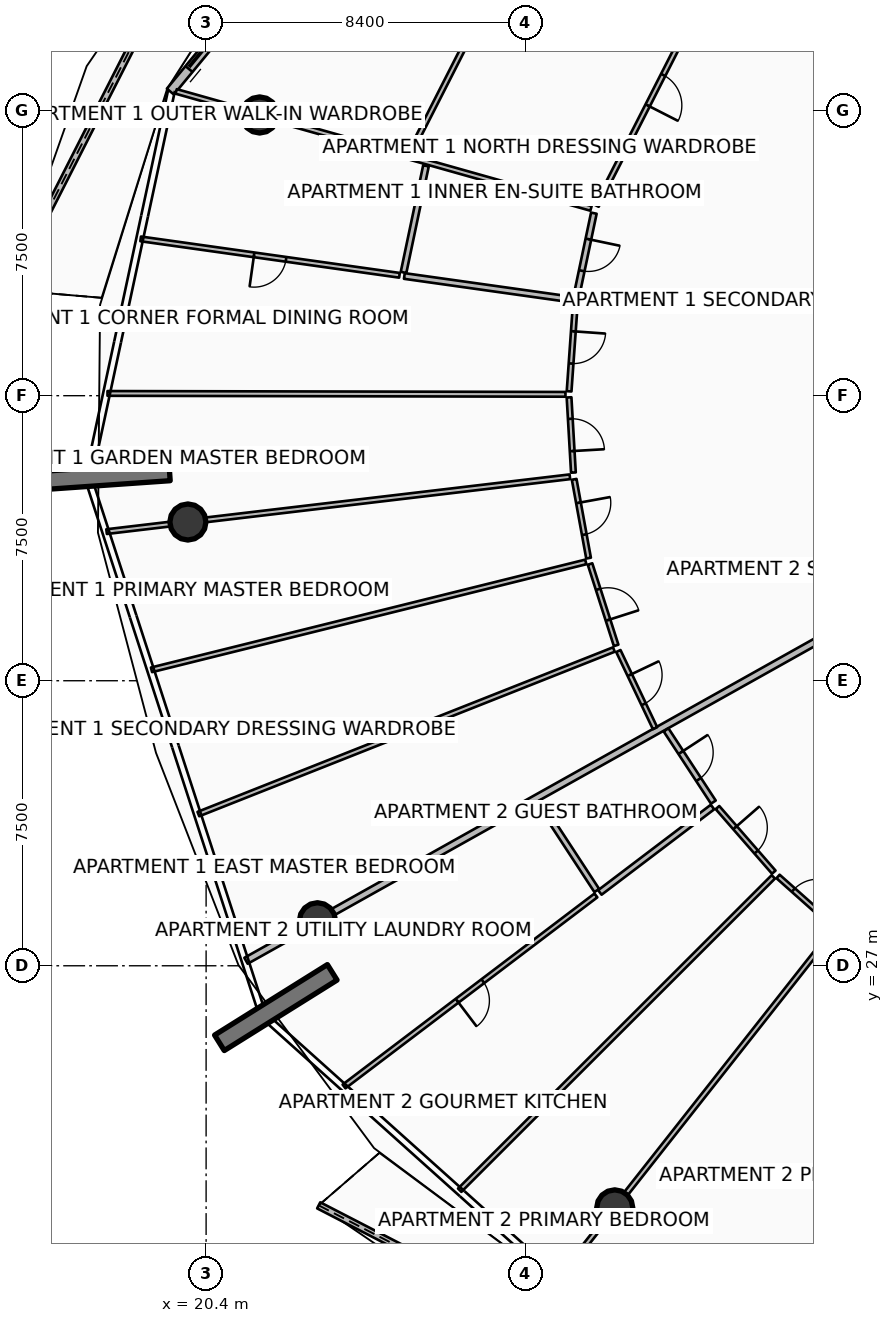
"""IFC4 building model, lengths in metres.
Left out: names, types, materials, properties, quantities, classifications, styles, units other than length and angle.
Written with IfcOpenShell. Run it as: python <this file> out.ifc"""

import sys

from ifc_helpers import new_model, si_unit, direction, frame, frame_2d, origin, origin_2d, place, context, subcontext, project, spatial, polyline, rectangle, circle, outline, extrude, element, fill, save


model = new_model("IFC4")
c1 = context("Model", 3, precision=1e-05, world=origin(), true_north=direction((0.0, 1.0)))
c2 = subcontext(c1, "Body", "Model", "MODEL_VIEW")
j1 = project(units=[si_unit("LENGTHUNIT", "METRE"), si_unit("PLANEANGLEUNIT", "RADIAN")], contexts=[c1])
p1 = place(None, origin())
s1 = spatial("IfcSite", under=j1, at=p1, CompositionType="ELEMENT")
p2 = place(p1, origin())
s2 = spatial("IfcBuilding", under=s1, at=p2, CompositionType="ELEMENT")
p3 = place(p2, frame((0.0, 0.0, 255.95)))
s3 = spatial("IfcBuildingStorey", under=s2, at=p3, CompositionType="ELEMENT", Elevation=255.95)
p4 = place(p3, frame((19.438, 40.003, 0.0), z_axis=(0.0, 0.0, 1.0), x_axis=(-0.997563824095, -0.069759707979, 0.0)))
e1 = element("IfcWall", 1, at=p4, inside=s3, PredefinedType="SOLIDWALL", context=c2, shape_type="SweptSolid", body=[
    extrude(rectangle(XDim=3.5, YDim=0.48, at=frame_2d((1.75, 0.0))), origin(), (0.0, 0.0, 1.0), 3.85),
])
p5 = place(p3, frame((23.719, 26.827, 0.0), z_axis=(0.0, 0.0, 1.0), x_axis=(-0.848033572426, -0.529942506352, 0.0)))
e2 = element("IfcWall", 2, at=p5, inside=s3, PredefinedType="SOLIDWALL", context=c2, shape_type="SweptSolid", body=[
    extrude(rectangle(XDim=3.5, YDim=0.48, at=frame_2d((1.75, 0.0))), origin(), (0.0, 0.0, 1.0), 3.85),
])
for number, where, z_axis, x_axis in (
    (3, (21.809, 49.387, 0.0), (0.0, 0.0, 1.0), (1.0, 0.0, 0.0)),
    (4, (19.92, 38.677, 0.0), (0.0, 0.0, 1.0), (1.0, 0.0, 0.0)),
    (5, (23.33, 28.184, 0.0), (0.0, 0.0, 1.0), (1.0, 0.0, 0.0)),
    (6, (31.153, 20.629, 0.0), (0.0, 0.0, 1.0), (1.0, 0.0, 0.0)),
):
    element("IfcColumn", number, at=place(p3, frame(where, z_axis=z_axis, x_axis=x_axis)), inside=s3, PredefinedType="COLUMN", context=c2, shape_type="SweptSolid", body=[
        extrude(circle(Radius=0.475, at=origin_2d()), origin(), (0.0, 0.0, 1.0), 3.59),
    ])
p6 = place(p3, frame((20.758, 55.746, 0.0), z_axis=(0.0, 0.0, 1.0), x_axis=(-0.45375182612, -0.891128094211, 0.0)))
e7 = element("IfcWall", 7, at=p6, inside=s3, PredefinedType="PARAPET", context=c2, shape_type="SweptSolid", body=[
    extrude(outline(polyline([(0.0, 0.0), (12.3, 0.0), (12.3, 1.747), (6.15, 1.562), (0.0, 1.348), (0.0, 0.0)])), frame((0.0, 0.09, 0.0), z_axis=(0.0, -1.0, 0.0), x_axis=(1.0, 0.0, 0.0)), (0.0, 0.0, 1.0), 0.18),
])
p7 = place(p3, frame((23.363, 20.696, 0.0), z_axis=(0.0, 0.0, 1.0), x_axis=(0.888586869338, -0.458708377556, 0.0)))
e8 = element("IfcWall", 8, at=p7, inside=s3, PredefinedType="PARAPET", context=c2, shape_type="SweptSolid", body=[
    extrude(outline(polyline([(0.0, 0.0), (12.16, 0.0), (12.16, 1.148), (6.08, 1.284), (0.0, 1.483), (0.0, 0.0)])), frame((0.0, 0.09, 0.0), z_axis=(0.0, -1.0, 0.0), x_axis=(1.0, 0.0, 0.0)), (0.0, 0.0, 1.0), 0.18),
])
p8 = place(p3, frame((26.742, 58.822, 0.0), z_axis=(0.0, 0.0, 1.0), x_axis=(-0.636680093065, -0.771128043255, 0.0)))
e9 = element("IfcWall", 9, at=p8, inside=s3, PredefinedType="SOLIDWALL", context=c2, shape_type="SweptSolid", body=[
    extrude(rectangle(XDim=11.438, YDim=0.24, at=frame_2d((5.719, 0.0))), origin(), (0.0, 0.0, 1.0), 2.54),
])
p9 = place(p8, frame((9.218, 0.0, 0.0)))
e10 = element("IfcOpeningElement", 10, at=p9, cuts=e9, PredefinedType="OPENING", context=c2, shape_type="SweptSolid", body=[
    extrude(rectangle(XDim=1.45, YDim=2.15, at=frame_2d((0.725, 1.075))), frame((0.0, 0.13, 0.0), z_axis=(0.0, -1.0, 0.0), x_axis=(1.0, 0.0, 0.0)), (0.0, 0.0, 1.0), 0.26),
])
p10 = place(p8, frame((0.28, 0.0, 0.65)))
e11 = element("IfcOpeningElement", 11, at=p10, cuts=e9, PredefinedType="OPENING", context=c2, shape_type="SweptSolid", body=[
    extrude(rectangle(XDim=1.6, YDim=1.5, at=frame_2d((0.8, 0.75))), frame((0.0, 0.13, 0.0), z_axis=(0.0, -1.0, 0.0), x_axis=(1.0, 0.0, 0.0)), (0.0, 0.0, 1.0), 0.26),
])
p11 = place(p3, frame((37.054, 35.87, 0.0), z_axis=(0.0, 0.0, 1.0), x_axis=(-0.872490186067, -0.488631635506, 0.0)))
e12 = element("IfcWall", 12, at=p11, inside=s3, PredefinedType="PARTITIONING", context=c2, shape_type="SweptSolid", body=[
    extrude(rectangle(XDim=17.884, YDim=0.18, at=frame_2d((8.942, 0.0))), origin(), (0.0, 0.0, 1.0), 2.957),
])
p12 = place(p3, frame((33.772, 53.079, 0.0), z_axis=(0.0, 0.0, 1.0), x_axis=(-0.454012060349, -0.890995538181, 0.0)))
e13 = element("IfcWall", 13, at=p12, inside=s3, PredefinedType="PARTITIONING", context=c2, shape_type="SweptSolid", body=[
    extrude(rectangle(XDim=6.824, YDim=0.125, at=frame_2d((3.412, 0.0))), origin(), (0.0, 0.0, 1.0), 2.957),
])
p13 = place(p12, frame((2.962, 0.0, 0.0)))
e14 = element("IfcOpeningElement", 14, at=p13, cuts=e13, PredefinedType="OPENING", context=c2, shape_type="SweptSolid", body=[
    extrude(rectangle(XDim=0.9, YDim=2.08, at=frame_2d((0.45, 1.04))), frame((0.0, 0.073, 0.0), z_axis=(0.0, -1.0, 0.0), x_axis=(1.0, 0.0, 0.0)), (0.0, 0.0, 1.0), 0.145),
])
p14 = place(p3, frame((29.764, 56.239, 0.0), z_axis=(0.0, 0.0, 1.0), x_axis=(-0.453980126594, -0.891011809494, 0.0)))
e15 = element("IfcWall", 15, at=p14, inside=s3, PredefinedType="PARTITIONING", context=c2, shape_type="SweptSolid", body=[
    extrude(rectangle(XDim=8.816, YDim=0.125, at=frame_2d((4.408, 0.0))), origin(), (0.0, 0.0, 1.0), 2.957),
])
p15 = place(p14, frame((3.958, 0.0, 0.0)))
e16 = element("IfcOpeningElement", 16, at=p15, cuts=e15, PredefinedType="OPENING", context=c2, shape_type="SweptSolid", body=[
    extrude(rectangle(XDim=0.9, YDim=2.08, at=frame_2d((0.45, 1.04))), frame((0.0, 0.073, 0.0), z_axis=(0.0, -1.0, 0.0), x_axis=(1.0, 0.0, 0.0)), (0.0, 0.0, 1.0), 0.145),
])
p16 = place(p3, frame((30.528, 46.928, 0.0), z_axis=(0.0, 0.0, 1.0), x_axis=(-0.962454146261, 0.271444315367, 0.0)))
e17 = element("IfcWall", 17, at=p16, inside=s3, PredefinedType="PARTITIONING", context=c2, shape_type="SweptSolid", body=[
    extrude(rectangle(XDim=11.342, YDim=0.125, at=frame_2d((5.671, 0.0))), origin(), (0.0, 0.0, 1.0), 2.957),
])
p17 = place(p3, frame((30.603, 46.803, 0.0), z_axis=(0.0, 0.0, 1.0), x_axis=(-0.205906433606, -0.978571683935, 0.0)))
e18 = element("IfcWall", 18, at=p17, inside=s3, PredefinedType="PARTITIONING", context=c2, shape_type="SweptSolid", body=[
    extrude(rectangle(XDim=2.247, YDim=0.15, at=frame_2d((1.124, 0.0))), origin(), (0.0, 0.0, 1.0), 2.957),
])
p18 = place(p17, frame((0.698, 0.0, 0.0)))
e19 = element("IfcOpeningElement", 19, at=p18, cuts=e18, PredefinedType="OPENING", context=c2, shape_type="SweptSolid", body=[
    extrude(rectangle(XDim=0.85, YDim=2.06, at=frame_2d((0.425, 1.03))), frame((0.0, 0.085, 0.0), z_axis=(0.0, -1.0, 0.0), x_axis=(1.0, 0.0, 0.0)), (0.0, 0.0, 1.0), 0.17),
])
p19 = place(p3, frame((26.186, 48.049, 0.0), z_axis=(0.0, 0.0, 1.0), x_axis=(-0.205851663269, -0.97858320685, 0.0)))
e20 = element("IfcWall", 20, at=p19, inside=s3, PredefinedType="PARTITIONING", context=c2, shape_type="SweptSolid", body=[
    extrude(rectangle(XDim=2.866, YDim=0.15, at=frame_2d((1.433, 0.0))), origin(), (0.0, 0.0, 1.0), 2.957),
])
p20 = place(p3, frame((30.033, 44.528, 0.0), z_axis=(0.0, 0.0, 1.0), x_axis=(-0.990248320871, 0.139313542101, 0.0)))
e21 = element("IfcWall", 21, at=p20, inside=s3, PredefinedType="PARTITIONING", context=c2, shape_type="SweptSolid", body=[
    extrude(rectangle(XDim=4.46, YDim=0.15, at=frame_2d((2.23, 0.0))), origin(), (0.0, 0.0, 1.0), 3.03),
])
p21 = place(p3, frame((25.488, 45.168, 0.0), z_axis=(0.0, 0.0, 1.0), x_axis=(-0.990239896804, 0.139373407717, 0.0)))
e22 = element("IfcWall", 22, at=p21, inside=s3, PredefinedType="PARTITIONING", context=c2, shape_type="SweptSolid", body=[
    extrude(rectangle(XDim=6.877, YDim=0.125, at=frame_2d((3.438, 0.0))), origin(), (0.0, 0.0, 1.0), 3.03),
])
p22 = place(p21, frame((3.014, 0.0, 0.0)))
e23 = element("IfcOpeningElement", 23, at=p22, cuts=e22, PredefinedType="OPENING", context=c2, shape_type="SweptSolid", body=[
    extrude(rectangle(XDim=0.85, YDim=2.06, at=frame_2d((0.425, 1.03))), frame((0.0, 0.073, 0.0), z_axis=(0.0, -1.0, 0.0), x_axis=(1.0, 0.0, 0.0)), (0.0, 0.0, 1.0), 0.145),
])
p23 = place(p3, frame((29.856, 42.036, 0.0), z_axis=(0.0, 0.0, 1.0), x_axis=(-0.999998028993, 0.001985449601, 0.0)))
e24 = element("IfcWall", 24, at=p23, inside=s3, PredefinedType="PARTITIONING", context=c2, shape_type="SweptSolid", body=[
    extrude(rectangle(XDim=12.051, YDim=0.125, at=frame_2d((6.025, 0.0))), origin(), (0.0, 0.0, 1.0), 3.03),
])
p24 = place(p3, frame((30.116, 44.426, 0.0), z_axis=(0.0, 0.0, 1.0), x_axis=(-0.07082759095, -0.997488572546, 0.0)))
e25 = element("IfcWall", 25, at=p24, inside=s3, PredefinedType="PARTITIONING", context=c2, shape_type="SweptSolid", body=[
    extrude(rectangle(XDim=2.316, YDim=0.125, at=frame_2d((1.158, 0.0))), origin(), (0.0, 0.0, 1.0), 3.03),
])
p25 = place(p24, frame((0.733, 0.0, 0.0)))
e26 = element("IfcOpeningElement", 26, at=p25, cuts=e25, PredefinedType="OPENING", context=c2, shape_type="SweptSolid", body=[
    extrude(rectangle(XDim=0.85, YDim=2.06, at=frame_2d((0.425, 1.03))), frame((0.0, 0.073, 0.0), z_axis=(0.0, -1.0, 0.0), x_axis=(1.0, 0.0, 0.0)), (0.0, 0.0, 1.0), 0.145),
])
p26 = place(p3, frame((29.951, 41.956, 0.0), z_axis=(0.0, 0.0, 1.0), x_axis=(0.057790197943, -0.998328749973, 0.0)))
e27 = element("IfcWall", 27, at=p26, inside=s3, PredefinedType="PARTITIONING", context=c2, shape_type="SweptSolid", body=[
    extrude(rectangle(XDim=1.981, YDim=0.125, at=frame_2d((0.991, 0.0))), origin(), (0.0, 0.0, 1.0), 2.957),
])
p27 = place(p26, frame((0.566, 0.0, 0.0)))
e28 = element("IfcOpeningElement", 28, at=p27, cuts=e27, PredefinedType="OPENING", context=c2, shape_type="SweptSolid", body=[
    extrude(rectangle(XDim=0.85, YDim=2.06, at=frame_2d((0.425, 1.03))), frame((0.0, 0.073, 0.0), z_axis=(0.0, -1.0, 0.0), x_axis=(1.0, 0.0, 0.0)), (0.0, 0.0, 1.0), 0.145),
])
p28 = place(p3, frame((29.972, 39.866, 0.0), z_axis=(0.0, 0.0, 1.0), x_axis=(-0.993068089356, -0.117540503246, 0.0)))
e29 = element("IfcWall", 29, at=p28, inside=s3, PredefinedType="PARTITIONING", context=c2, shape_type="SweptSolid", body=[
    extrude(rectangle(XDim=12.276, YDim=0.125, at=frame_2d((6.138, 0.0))), origin(), (0.0, 0.0, 1.0), 2.957),
])
p29 = place(p3, frame((30.391, 37.626, 0.0), z_axis=(0.0, 0.0, 1.0), x_axis=(-0.970503640625, -0.24108646485, 0.0)))
e30 = element("IfcWall", 30, at=p29, inside=s3, PredefinedType="PARTITIONING", context=c2, shape_type="SweptSolid", body=[
    extrude(rectangle(XDim=11.775, YDim=0.125, at=frame_2d((5.888, 0.0))), origin(), (0.0, 0.0, 1.0), 3.03),
])
p30 = place(p3, frame((31.13, 35.321, 0.0), z_axis=(0.0, 0.0, 1.0), x_axis=(-0.929773898428, -0.368131087796, 0.0)))
e31 = element("IfcWall", 31, at=p30, inside=s3, PredefinedType="PARTITIONING", context=c2, shape_type="SweptSolid", body=[
    extrude(rectangle(XDim=11.76, YDim=0.125, at=frame_2d((5.88, 0.0))), origin(), (0.0, 0.0, 1.0), 3.03),
])
p31 = place(p3, frame((30.085, 39.799, 0.0), z_axis=(0.0, 0.0, 1.0), x_axis=(0.179690800857, -0.983723139957, 0.0)))
e32 = element("IfcWall", 32, at=p31, inside=s3, PredefinedType="PARTITIONING", context=c2, shape_type="SweptSolid", body=[
    extrude(rectangle(XDim=2.107, YDim=0.125, at=frame_2d((1.054, 0.0))), origin(), (0.0, 0.0, 1.0), 2.957),
])
p32 = place(p31, frame((0.629, 0.0, 0.0)))
e33 = element("IfcOpeningElement", 33, at=p32, cuts=e32, PredefinedType="OPENING", context=c2, shape_type="SweptSolid", body=[
    extrude(rectangle(XDim=0.85, YDim=2.06, at=frame_2d((0.425, 1.03))), frame((0.0, 0.073, 0.0), z_axis=(0.0, -1.0, 0.0), x_axis=(1.0, 0.0, 0.0)), (0.0, 0.0, 1.0), 0.145),
])
p33 = place(p3, frame((30.503, 37.571, 0.0), z_axis=(0.0, 0.0, 1.0), x_axis=(0.305327243998, -0.952247485727, 0.0)))
e34 = element("IfcWall", 34, at=p33, inside=s3, PredefinedType="PARTITIONING", context=c2, shape_type="SweptSolid", body=[
    extrude(rectangle(XDim=2.249, YDim=0.125, at=frame_2d((1.124, 0.0))), origin(), (0.0, 0.0, 1.0), 3.03),
])
p34 = place(p33, frame((0.699, 0.0, 0.0)))
e35 = element("IfcOpeningElement", 35, at=p34, cuts=e34, PredefinedType="OPENING", context=c2, shape_type="SweptSolid", body=[
    extrude(rectangle(XDim=0.85, YDim=2.06, at=frame_2d((0.425, 1.03))), frame((0.0, 0.073, 0.0), z_axis=(0.0, -1.0, 0.0), x_axis=(1.0, 0.0, 0.0)), (0.0, 0.0, 1.0), 0.145),
])
p35 = place(p3, frame((31.248, 35.281, 0.0), z_axis=(0.0, 0.0, 1.0), x_axis=(0.429406696771, -0.903111227241, 0.0)))
e36 = element("IfcWall", 36, at=p35, inside=s3, PredefinedType="PARTITIONING", context=c2, shape_type="SweptSolid", body=[
    extrude(rectangle(XDim=2.249, YDim=0.125, at=frame_2d((1.124, 0.0))), origin(), (0.0, 0.0, 1.0), 2.957),
])
p36 = place(p35, frame((0.699, 0.0, 0.0)))
e37 = element("IfcOpeningElement", 37, at=p36, cuts=e36, PredefinedType="OPENING", context=c2, shape_type="SweptSolid", body=[
    extrude(rectangle(XDim=0.85, YDim=2.06, at=frame_2d((0.425, 1.03))), frame((0.0, 0.073, 0.0), z_axis=(0.0, -1.0, 0.0), x_axis=(1.0, 0.0, 0.0)), (0.0, 0.0, 1.0), 0.145),
])
p37 = place(p3, frame((36.903, 27.924, 0.0), z_axis=(0.0, 0.0, 1.0), x_axis=(-0.619090039254, -0.785320013304, 0.0)))
e38 = element("IfcWall", 38, at=p37, inside=s3, PredefinedType="PARTITIONING", context=c2, shape_type="SweptSolid", body=[
    extrude(rectangle(XDim=11.672, YDim=0.125, at=frame_2d((5.836, 0.0))), origin(), (0.0, 0.0, 1.0), 2.957),
])
p38 = place(p3, frame((32.503, 33.207, 0.0), z_axis=(0.0, 0.0, 1.0), x_axis=(0.54776176335, -0.836634358972, 0.0)))
e39 = element("IfcWall", 39, at=p38, inside=s3, PredefinedType="PARTITIONING", context=c2, shape_type="SweptSolid", body=[
    extrude(rectangle(XDim=2.272, YDim=0.15, at=frame_2d((1.136, 0.0))), origin(), (0.0, 0.0, 1.0), 2.957),
])
p39 = place(p38, frame((0.711, 0.0, 0.0)))
e40 = element("IfcOpeningElement", 40, at=p39, cuts=e39, PredefinedType="OPENING", context=c2, shape_type="SweptSolid", body=[
    extrude(rectangle(XDim=0.85, YDim=2.06, at=frame_2d((0.425, 1.03))), frame((0.0, 0.085, 0.0), z_axis=(0.0, -1.0, 0.0), x_axis=(1.0, 0.0, 0.0)), (0.0, 0.0, 1.0), 0.17),
])
p40 = place(p3, frame((29.144, 31.326, 0.0), z_axis=(0.0, 0.0, 1.0), x_axis=(0.547727893033, -0.836656533587, 0.0)))
e41 = element("IfcWall", 41, at=p40, inside=s3, PredefinedType="PARTITIONING", context=c2, shape_type="SweptSolid", body=[
    extrude(rectangle(XDim=2.804, YDim=0.15, at=frame_2d((1.402, 0.0))), origin(), (0.0, 0.0, 1.0), 2.957),
])
p41 = place(p3, frame((33.725, 31.177, 0.0), z_axis=(0.0, 0.0, 1.0), x_axis=(-0.796854692537, -0.604171001441, 0.0)))
e42 = element("IfcWall", 42, at=p41, inside=s3, PredefinedType="PARTITIONING", context=c2, shape_type="SweptSolid", body=[
    extrude(rectangle(XDim=3.72, YDim=0.15, at=frame_2d((1.86, 0.0))), origin(), (0.0, 0.0, 1.0), 3.03),
])
p42 = place(p3, frame((30.657, 28.851, 0.0), z_axis=(0.0, 0.0, 1.0), x_axis=(-0.796843780875, -0.604185392807, 0.0)))
e43 = element("IfcWall", 43, at=p42, inside=s3, PredefinedType="PARTITIONING", context=c2, shape_type="SweptSolid", body=[
    extrude(rectangle(XDim=8.318, YDim=0.125, at=frame_2d((4.159, 0.0))), origin(), (0.0, 0.0, 1.0), 3.03),
])
p43 = place(p42, frame((3.734, 0.0, 0.0)))
e44 = element("IfcOpeningElement", 44, at=p43, cuts=e43, PredefinedType="OPENING", context=c2, shape_type="SweptSolid", body=[
    extrude(rectangle(XDim=0.85, YDim=2.06, at=frame_2d((0.425, 1.03))), frame((0.0, 0.073, 0.0), z_axis=(0.0, -1.0, 0.0), x_axis=(1.0, 0.0, 0.0)), (0.0, 0.0, 1.0), 0.145),
])
p44 = place(p3, frame((35.326, 29.34, 0.0), z_axis=(0.0, 0.0, 1.0), x_axis=(-0.707472916484, -0.706740456208, 0.0)))
e45 = element("IfcWall", 45, at=p44, inside=s3, PredefinedType="PARTITIONING", context=c2, shape_type="SweptSolid", body=[
    extrude(rectangle(XDim=11.666, YDim=0.125, at=frame_2d((5.833, 0.0))), origin(), (0.0, 0.0, 1.0), 3.03),
])
p45 = place(p3, frame((33.856, 31.163, 0.0), z_axis=(0.0, 0.0, 1.0), x_axis=(0.656985315096, -0.753903372952, 0.0)))
e46 = element("IfcWall", 46, at=p45, inside=s3, PredefinedType="PARTITIONING", context=c2, shape_type="SweptSolid", body=[
    extrude(rectangle(XDim=2.255, YDim=0.125, at=frame_2d((1.127, 0.0))), origin(), (0.0, 0.0, 1.0), 3.03),
])
p46 = place(p45, frame((0.702, 0.0, 0.0)))
e47 = element("IfcOpeningElement", 47, at=p46, cuts=e46, PredefinedType="OPENING", context=c2, shape_type="SweptSolid", body=[
    extrude(rectangle(XDim=0.85, YDim=2.06, at=frame_2d((0.425, 1.03))), frame((0.0, 0.073, 0.0), z_axis=(0.0, -1.0, 0.0), x_axis=(1.0, 0.0, 0.0)), (0.0, 0.0, 1.0), 0.145),
])
p47 = place(p3, frame((35.45, 29.35, 0.0), z_axis=(0.0, 0.0, 1.0), x_axis=(0.747360411924, -0.664418854857, 0.0)))
e48 = element("IfcWall", 48, at=p47, inside=s3, PredefinedType="PARTITIONING", context=c2, shape_type="SweptSolid", body=[
    extrude(rectangle(XDim=1.928, YDim=0.125, at=frame_2d((0.964, 0.0))), origin(), (0.0, 0.0, 1.0), 2.957),
])
p48 = place(p47, frame((0.539, 0.0, 0.0)))
e49 = element("IfcOpeningElement", 49, at=p48, cuts=e48, PredefinedType="OPENING", context=c2, shape_type="SweptSolid", body=[
    extrude(rectangle(XDim=0.85, YDim=2.06, at=frame_2d((0.425, 1.03))), frame((0.0, 0.073, 0.0), z_axis=(0.0, -1.0, 0.0), x_axis=(1.0, 0.0, 0.0)), (0.0, 0.0, 1.0), 0.145),
])
p49 = place(p9, origin())
e50 = element("IfcDoor", 50, at=p49, inside=s3, OperationType="DOUBLE_DOOR_SLIDING", PredefinedType="DOOR", context=c2, shape_type="SweptSolid", body=[
    extrude(rectangle(XDim=1.45, YDim=2.15, at=frame_2d((0.725, 1.075))), frame((0.0, 0.025, 0.0), z_axis=(0.0, -1.0, 0.0), x_axis=(1.0, 0.0, 0.0)), (0.0, 0.0, 1.0), 0.05),
])
fill(e10, e50)
p50 = place(p13, origin())
e51 = element("IfcDoor", 51, at=p50, inside=s3, OperationType="SINGLE_SWING_RIGHT", PredefinedType="DOOR", context=c2, shape_type="SweptSolid", body=[
    extrude(rectangle(XDim=0.9, YDim=2.08, at=frame_2d((0.45, 1.04))), frame((0.0, 0.025, 0.0), z_axis=(0.0, -1.0, 0.0), x_axis=(1.0, 0.0, 0.0)), (0.0, 0.0, 1.0), 0.05),
])
fill(e14, e51)
p51 = place(p18, origin())
e52 = element("IfcDoor", 52, at=p51, inside=s3, OperationType="SINGLE_SWING_LEFT", PredefinedType="DOOR", context=c2, shape_type="SweptSolid", body=[
    extrude(rectangle(XDim=0.85, YDim=2.06, at=frame_2d((0.425, 1.03))), frame((0.0, 0.025, 0.0), z_axis=(0.0, -1.0, 0.0), x_axis=(1.0, 0.0, 0.0)), (0.0, 0.0, 1.0), 0.05),
])
fill(e19, e52)
p52 = place(p22, origin())
e53 = element("IfcDoor", 53, at=p52, inside=s3, OperationType="SINGLE_SWING_RIGHT", PredefinedType="DOOR", context=c2, shape_type="SweptSolid", body=[
    extrude(rectangle(XDim=0.85, YDim=2.06, at=frame_2d((0.425, 1.03))), frame((0.0, 0.025, 0.0), z_axis=(0.0, -1.0, 0.0), x_axis=(1.0, 0.0, 0.0)), (0.0, 0.0, 1.0), 0.05),
])
fill(e23, e53)
p53 = place(p25, origin())
e54 = element("IfcDoor", 54, at=p53, inside=s3, OperationType="SINGLE_SWING_LEFT", PredefinedType="DOOR", context=c2, shape_type="SweptSolid", body=[
    extrude(rectangle(XDim=0.85, YDim=2.06, at=frame_2d((0.425, 1.03))), frame((0.0, 0.025, 0.0), z_axis=(0.0, -1.0, 0.0), x_axis=(1.0, 0.0, 0.0)), (0.0, 0.0, 1.0), 0.05),
])
fill(e26, e54)
p54 = place(p27, origin())
e55 = element("IfcDoor", 55, at=p54, inside=s3, OperationType="SINGLE_SWING_RIGHT", PredefinedType="DOOR", context=c2, shape_type="SweptSolid", body=[
    extrude(rectangle(XDim=0.85, YDim=2.06, at=frame_2d((0.425, 1.03))), frame((0.0, 0.025, 0.0), z_axis=(0.0, -1.0, 0.0), x_axis=(1.0, 0.0, 0.0)), (0.0, 0.0, 1.0), 0.05),
])
fill(e28, e55)
p55 = place(p32, origin())
e56 = element("IfcDoor", 56, at=p55, inside=s3, OperationType="SINGLE_SWING_LEFT", PredefinedType="DOOR", context=c2, shape_type="SweptSolid", body=[
    extrude(rectangle(XDim=0.85, YDim=2.06, at=frame_2d((0.425, 1.03))), frame((0.0, 0.025, 0.0), z_axis=(0.0, -1.0, 0.0), x_axis=(1.0, 0.0, 0.0)), (0.0, 0.0, 1.0), 0.05),
])
fill(e33, e56)
p56 = place(p34, origin())
e57 = element("IfcDoor", 57, at=p56, inside=s3, OperationType="SINGLE_SWING_RIGHT", PredefinedType="DOOR", context=c2, shape_type="SweptSolid", body=[
    extrude(rectangle(XDim=0.85, YDim=2.06, at=frame_2d((0.425, 1.03))), frame((0.0, 0.025, 0.0), z_axis=(0.0, -1.0, 0.0), x_axis=(1.0, 0.0, 0.0)), (0.0, 0.0, 1.0), 0.05),
])
fill(e35, e57)
p57 = place(p36, origin())
e58 = element("IfcDoor", 58, at=p57, inside=s3, OperationType="SINGLE_SWING_LEFT", PredefinedType="DOOR", context=c2, shape_type="SweptSolid", body=[
    extrude(rectangle(XDim=0.85, YDim=2.06, at=frame_2d((0.425, 1.03))), frame((0.0, 0.025, 0.0), z_axis=(0.0, -1.0, 0.0), x_axis=(1.0, 0.0, 0.0)), (0.0, 0.0, 1.0), 0.05),
])
fill(e37, e58)
p58 = place(p39, origin())
e59 = element("IfcDoor", 59, at=p58, inside=s3, OperationType="SINGLE_SWING_LEFT", PredefinedType="DOOR", context=c2, shape_type="SweptSolid", body=[
    extrude(rectangle(XDim=0.85, YDim=2.06, at=frame_2d((0.425, 1.03))), frame((0.0, 0.025, 0.0), z_axis=(0.0, -1.0, 0.0), x_axis=(1.0, 0.0, 0.0)), (0.0, 0.0, 1.0), 0.05),
])
fill(e40, e59)
p59 = place(p43, origin())
e60 = element("IfcDoor", 60, at=p59, inside=s3, OperationType="SINGLE_SWING_RIGHT", PredefinedType="DOOR", context=c2, shape_type="SweptSolid", body=[
    extrude(rectangle(XDim=0.85, YDim=2.06, at=frame_2d((0.425, 1.03))), frame((0.0, 0.025, 0.0), z_axis=(0.0, -1.0, 0.0), x_axis=(1.0, 0.0, 0.0)), (0.0, 0.0, 1.0), 0.05),
])
fill(e44, e60)
p60 = place(p46, origin())
e61 = element("IfcDoor", 61, at=p60, inside=s3, OperationType="SINGLE_SWING_LEFT", PredefinedType="DOOR", context=c2, shape_type="SweptSolid", body=[
    extrude(rectangle(XDim=0.85, YDim=2.06, at=frame_2d((0.425, 1.03))), frame((0.0, 0.025, 0.0), z_axis=(0.0, -1.0, 0.0), x_axis=(1.0, 0.0, 0.0)), (0.0, 0.0, 1.0), 0.05),
])
fill(e47, e61)
p61 = place(p48, origin())
e62 = element("IfcDoor", 62, at=p61, inside=s3, OperationType="SINGLE_SWING_RIGHT", PredefinedType="DOOR", context=c2, shape_type="SweptSolid", body=[
    extrude(rectangle(XDim=0.85, YDim=2.06, at=frame_2d((0.425, 1.03))), frame((0.0, 0.025, 0.0), z_axis=(0.0, -1.0, 0.0), x_axis=(1.0, 0.0, 0.0)), (0.0, 0.0, 1.0), 0.05),
])
fill(e49, e62)
save(model, sys.argv[1])
